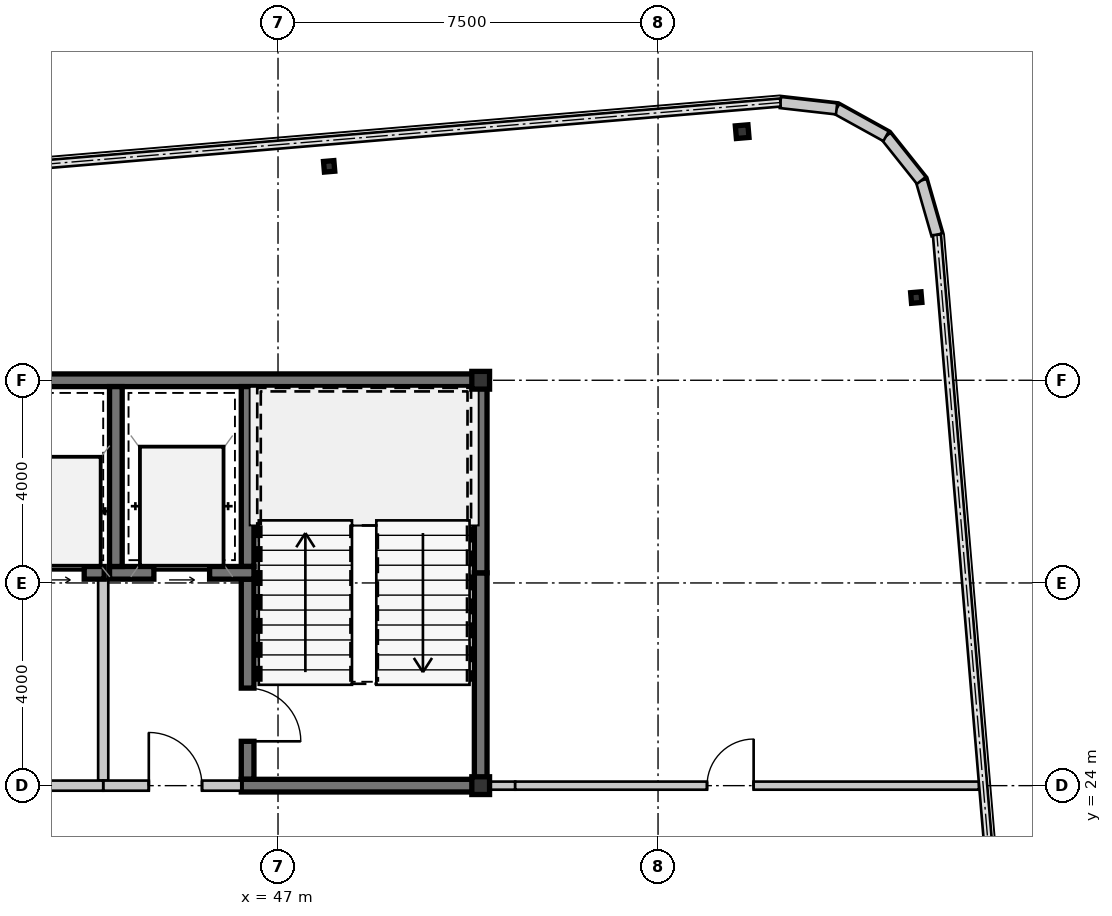
"""IFC4 building model, lengths in metres.
Left out: names, types, materials, properties, quantities, classifications, styles, units other than length and angle.
Written with IfcOpenShell. Run it as: python <this file> out.ifc"""

import sys

from ifc_helpers import new_model, si_unit, direction, frame, frame_2d, origin, origin_2d, place, context, subcontext, project, spatial, rectangle, hollow_rectangle, i_section, extrude, source, transform, mapped, element, fill, save


model = new_model("IFC4")
c1 = context("Model", 3, precision=1e-05, world=origin(), true_north=direction((0.0, 1.0)))
c2 = subcontext(c1, "Body", "Model", "MODEL_VIEW")
j1 = project(units=[si_unit("LENGTHUNIT", "METRE"), si_unit("PLANEANGLEUNIT", "RADIAN")], contexts=[c1])
p1 = place(None, origin())
s1 = spatial("IfcSite", under=j1, at=p1, CompositionType="ELEMENT")
p2 = place(p1, origin())
s2 = spatial("IfcBuilding", under=s1, at=p2, CompositionType="ELEMENT")
p3 = place(p2, frame((0.0, 0.0, 178.85)))
s3 = spatial("IfcBuildingStorey", under=s2, at=p3, CompositionType="ELEMENT", Elevation=178.85)
m1 = source(origin(), c2, "Body", "SweptSolid", [
    extrude(hollow_rectangle(XDim=0.35, YDim=0.35, WallThickness=0.016, at=origin_2d()), origin(), (0.0, 0.0, 1.0), 3.15),
])
for number, where, z_axis, x_axis in (
    (1, (51.0, 24.0, 0.0), (0.0, 0.0, 1.0), (1.0, 0.0, 0.0)),
    (2, (51.0, 32.0, 0.0), (0.0, 0.0, 1.0), (1.0, 0.0, 0.0)),
):
    element("IfcColumn", number, at=place(p3, frame(where, z_axis=z_axis, x_axis=x_axis)), inside=s3, PredefinedType="COLUMN", context=c2, shape_type="MappedRepresentation", body=[
        mapped(m1, transform((0.0, 0.0, 0.0), scale=1.0)),
    ])
m2 = source(origin(), c2, "Body", "SweptSolid", [
    extrude(i_section(OverallWidth=0.205, OverallDepth=0.21, WebThickness=0.009, FlangeThickness=0.014, at=origin_2d()), origin(), (0.0, 0.0, 1.0), 3.15),
])
p4 = place(p3, frame((48.009, 36.221, 0.0), z_axis=(0.0, 0.0, 1.0), x_axis=(0.99649285925, 0.083677843332, 0.0)))
e3 = element("IfcColumn", 3, at=p4, inside=s3, PredefinedType="COLUMN", context=c2, shape_type="MappedRepresentation", body=[
    mapped(m2, transform((0.0, 0.0, 0.0), scale=1.0)),
])
m3 = source(origin(), c2, "Body", "SweptSolid", [
    extrude(hollow_rectangle(XDim=0.25, YDim=0.25, WallThickness=0.01, at=origin_2d()), origin(), (0.0, 0.0, 1.0), 3.15),
])
p5 = place(p3, frame((56.16, 36.906, 0.0), z_axis=(0.0, 0.0, 1.0), x_axis=(0.99649285925, 0.083677843332, 0.0)))
e4 = element("IfcColumn", 4, at=p5, inside=s3, PredefinedType="COLUMN", context=c2, shape_type="MappedRepresentation", body=[
    mapped(m3, transform((0.0, 0.0, 0.0), scale=1.0)),
])
p6 = place(p3, frame((59.596, 33.632, 0.0), z_axis=(0.0, 0.0, 1.0), x_axis=(0.99649285925, 0.083677843332, 0.0)))
e5 = element("IfcColumn", 5, at=p6, inside=s3, PredefinedType="COLUMN", context=c2, shape_type="MappedRepresentation", body=[
    mapped(m2, transform((0.0, 0.0, 0.0), scale=1.0)),
])
m4 = source(origin(), c2, "Body", "SweptSolid", [
    extrude(rectangle(XDim=1.116, YDim=0.22, at=frame_2d((0.558, 0.0))), origin(), (0.0, 0.0, 1.0), 2.93),
])
for number, where, z_axis, x_axis in (
    (6, (60.004, 34.87, 0.0), (0.0, 0.0, 1.0), (-0.277, 0.961, 0.0)),
    (7, (59.696, 35.943, 0.0), (0.0, 0.0, 1.0), (-0.623, 0.782, 0.0)),
    (8, (59.0, 36.816, 0.0), (0.0, 0.0, 1.0), (-0.875, 0.484, 0.0)),
    (9, (58.024, 37.356, 0.0), (0.0, 0.0, 1.0), (-0.994, 0.112, 0.0)),
):
    element("IfcWall", number, at=place(p3, frame(where, z_axis=z_axis, x_axis=x_axis)), inside=s3, PredefinedType="SOLIDWALL", context=c2, shape_type="MappedRepresentation", body=[
        mapped(m4, transform((0.0, 0.0, 0.0), scale=1.0)),
    ])
m5 = source(origin(), c2, "Body", "SweptSolid", [
    extrude(rectangle(XDim=11.925, YDim=0.25, at=frame_2d((5.962, 0.0))), origin(), (0.0, 0.0, 1.0), 2.93),
])
p7 = place(p3, frame((39.2, 32.0, 0.0), z_axis=(0.0, 0.0, 1.0), x_axis=(1.0, 0.0, 0.0)))
e10 = element("IfcWall", 10, at=p7, inside=s3, PredefinedType="SHEAR", context=c2, shape_type="MappedRepresentation", body=[
    mapped(m5, transform((0.0, 0.0, 0.0), scale=1.0)),
])
m6 = source(origin(), c2, "Body", "SweptSolid", [
    extrude(rectangle(XDim=4.075, YDim=0.25, at=frame_2d((2.038, 0.0))), origin(), (0.0, 0.0, 1.0), 2.93),
])
p8 = place(p3, frame((51.0, 24.125, 0.0), z_axis=(0.0, 0.0, 1.0), x_axis=(0.0, 1.0, 0.0)))
e11 = element("IfcWall", 11, at=p8, inside=s3, PredefinedType="SHEAR", context=c2, shape_type="MappedRepresentation", body=[
    mapped(m6, transform((0.0, 0.0, 0.0), scale=1.0)),
])
m7 = source(origin(), c2, "Body", "SweptSolid", [
    extrude(rectangle(XDim=3.675, YDim=0.25, at=frame_2d((1.837, 0.0))), origin(), (0.0, 0.0, 1.0), 2.93),
])
p9 = place(p3, frame((51.0, 28.2, 0.0), z_axis=(0.0, 0.0, 1.0), x_axis=(0.0, 1.0, 0.0)))
e12 = element("IfcWall", 12, at=p9, inside=s3, PredefinedType="SHEAR", context=c2, shape_type="MappedRepresentation", body=[
    mapped(m7, transform((0.0, 0.0, 0.0), scale=1.0)),
])
m8 = source(origin(), c2, "Body", "SweptSolid", [
    extrude(rectangle(XDim=3.55, YDim=0.25, at=frame_2d((1.775, 0.0))), origin(), (0.0, 0.0, 1.0), 2.93),
])
p10 = place(p3, frame((46.4, 31.875, 0.0), z_axis=(0.0, 0.0, 1.0), x_axis=(0.0, -1.0, 0.0)))
e13 = element("IfcWall", 13, at=p10, inside=s3, PredefinedType="SHEAR", context=c2, shape_type="MappedRepresentation", body=[
    mapped(m8, transform((0.0, 0.0, 0.0), scale=1.0)),
])
m9 = source(origin(), c2, "Body", "SweptSolid", [
    extrude(rectangle(XDim=3.95, YDim=0.25, at=frame_2d((1.975, 0.0))), origin(), (0.0, 0.0, 1.0), 2.93),
])
p11 = place(p3, frame((46.4, 28.075, 0.0), z_axis=(0.0, 0.0, 1.0), x_axis=(0.0, -1.0, 0.0)))
e14 = element("IfcWall", 14, at=p11, inside=s3, PredefinedType="SHEAR", context=c2, shape_type="MappedRepresentation", body=[
    mapped(m9, transform((0.0, 0.0, 0.0), scale=1.0)),
])
m10 = source(origin(), c2, "Body", "SweptSolid", [
    extrude(rectangle(XDim=1.05, YDim=2.1, at=frame_2d((0.525, 1.05))), frame((0.0, 0.135, 0.0), z_axis=(0.0, -1.0, 0.0), x_axis=(1.0, 0.0, 0.0)), (0.0, 0.0, 1.0), 0.27),
])
p12 = place(p11, frame((2.15, 0.0, 0.0)))
e15 = element("IfcOpeningElement", 15, at=p12, cuts=e14, PredefinedType="OPENING", context=c2, shape_type="MappedRepresentation", body=[
    mapped(m10, transform((0.0, 0.0, 0.0), scale=1.0)),
])
m11 = source(origin(), c2, "Body", "SweptSolid", [
    extrude(rectangle(XDim=4.85, YDim=0.25, at=frame_2d((2.425, 0.0))), origin(), (0.0, 0.0, 1.0), 2.93),
])
p13 = place(p3, frame((46.275, 24.0, 0.0), z_axis=(0.0, 0.0, 1.0), x_axis=(1.0, 0.0, 0.0)))
e16 = element("IfcWall", 16, at=p13, inside=s3, PredefinedType="SHEAR", context=c2, shape_type="MappedRepresentation", body=[
    mapped(m11, transform((0.0, 0.0, 0.0), scale=1.0)),
])
m12 = source(origin(), c2, "Body", "SweptSolid", [
    extrude(rectangle(XDim=2.85, YDim=0.25, at=frame_2d((1.425, 0.0))), origin(), (0.0, 0.0, 1.0), 2.93),
])
p14 = place(p3, frame((43.675, 28.2, 0.0), z_axis=(0.0, 0.0, 1.0), x_axis=(1.0, 0.0, 0.0)))
e17 = element("IfcWall", 17, at=p14, inside=s3, PredefinedType="SHEAR", context=c2, shape_type="MappedRepresentation", body=[
    mapped(m12, transform((0.0, 0.0, 0.0), scale=1.0)),
])
m13 = source(origin(), c2, "Body", "SweptSolid", [
    extrude(rectangle(XDim=1.1, YDim=2.15, at=frame_2d((0.55, 1.075))), frame((0.0, 0.135, 0.0), z_axis=(0.0, -1.0, 0.0), x_axis=(1.0, 0.0, 0.0)), (0.0, 0.0, 1.0), 0.27),
])
p15 = place(p14, frame((0.875, 0.0, 0.0)))
e18 = element("IfcOpeningElement", 18, at=p15, cuts=e17, PredefinedType="OPENING", context=c2, shape_type="MappedRepresentation", body=[
    mapped(m13, transform((0.0, 0.0, 0.0), scale=1.0)),
])
p16 = place(p3, frame((43.8, 31.875, 0.0), z_axis=(0.0, 0.0, 1.0), x_axis=(0.0, -1.0, 0.0)))
e19 = element("IfcWall", 19, at=p16, inside=s3, PredefinedType="SHEAR", context=c2, shape_type="MappedRepresentation", body=[
    mapped(m8, transform((0.0, 0.0, 0.0), scale=1.0)),
])
m14 = source(origin(), c2, "Body", "SweptSolid", [
    extrude(rectangle(XDim=3.975, YDim=0.2, at=frame_2d((1.987, 0.0))), origin(), (0.0, 0.0, 1.0), 2.93),
])
p17 = place(p3, frame((43.55, 28.075, 0.0), z_axis=(0.0, 0.0, 1.0), x_axis=(0.0, -1.0, 0.0)))
e20 = element("IfcWall", 20, at=p17, inside=s3, PredefinedType="SOLIDWALL", context=c2, shape_type="MappedRepresentation", body=[
    mapped(m14, transform((0.0, 0.0, 0.0), scale=1.0)),
])
m15 = source(origin(), c2, "Body", "SweptSolid", [
    extrude(rectangle(XDim=2.725, YDim=0.2, at=frame_2d((1.362, 0.0))), origin(), (0.0, 0.0, 1.0), 2.397),
])
p18 = place(p3, frame((43.55, 24.0, 0.0), z_axis=(0.0, 0.0, 1.0), x_axis=(1.0, 0.0, 0.0)))
e21 = element("IfcWall", 21, at=p18, inside=s3, PredefinedType="SOLIDWALL", context=c2, shape_type="MappedRepresentation", body=[
    mapped(m15, transform((0.0, 0.0, 0.0), scale=1.0)),
])
m16 = source(origin(), c2, "Body", "SweptSolid", [
    extrude(rectangle(XDim=1.05, YDim=2.1, at=frame_2d((0.525, 1.05))), frame((0.0, 0.11, 0.0), z_axis=(0.0, -1.0, 0.0), x_axis=(1.0, 0.0, 0.0)), (0.0, 0.0, 1.0), 0.22),
])
p19 = place(p18, frame((0.9, 0.0, 0.0)))
e22 = element("IfcOpeningElement", 22, at=p19, cuts=e21, PredefinedType="OPENING", context=c2, shape_type="MappedRepresentation", body=[
    mapped(m16, transform((0.0, 0.0, 0.0), scale=1.0)),
])
m17 = source(origin(), c2, "Body", "SweptSolid", [
    extrude(rectangle(XDim=2.07, YDim=0.25, at=frame_2d((1.035, 0.0))), origin(), (0.0, 0.0, 1.0), 2.93),
])
p20 = place(p3, frame((41.5, 28.2, 0.0), z_axis=(0.0, 0.0, 1.0), x_axis=(1.0, 0.0, 0.0)))
e23 = element("IfcWall", 23, at=p20, inside=s3, PredefinedType="SHEAR", context=c2, shape_type="MappedRepresentation", body=[
    mapped(m17, transform((0.0, 0.0, 0.0), scale=1.0)),
])
m18 = source(origin(), c2, "Body", "SweptSolid", [
    extrude(rectangle(XDim=1.05, YDim=2.15, at=frame_2d((0.525, 1.075))), frame((0.0, 0.135, 0.0), z_axis=(0.0, -1.0, 0.0), x_axis=(1.0, 0.0, 0.0)), (0.0, 0.0, 1.0), 0.27),
])
p21 = place(p20, frame((0.625, 0.0, 0.0)))
e24 = element("IfcOpeningElement", 24, at=p21, cuts=e23, PredefinedType="OPENING", context=c2, shape_type="MappedRepresentation", body=[
    mapped(m18, transform((0.0, 0.0, 0.0), scale=1.0)),
])
m19 = source(origin(), c2, "Body", "SweptSolid", [
    extrude(rectangle(XDim=4.35, YDim=0.2, at=frame_2d((2.175, 0.0))), origin(), (0.0, 0.0, 1.0), 2.397),
])
p22 = place(p3, frame((43.55, 24.0, 0.0), z_axis=(0.0, 0.0, 1.0), x_axis=(-1.0, 0.0, 0.0)))
e25 = element("IfcWall", 25, at=p22, inside=s3, PredefinedType="SOLIDWALL", context=c2, shape_type="MappedRepresentation", body=[
    mapped(m19, transform((0.0, 0.0, 0.0), scale=1.0)),
])
p23 = place(p22, frame((1.65, 0.0, 0.0)))
e26 = element("IfcOpeningElement", 26, at=p23, cuts=e25, PredefinedType="OPENING", context=c2, shape_type="MappedRepresentation", body=[
    mapped(m16, transform((0.0, 0.0, 0.0), scale=1.0)),
])
m20 = source(origin(), c2, "Body", "SweptSolid", [
    extrude(rectangle(XDim=0.556, YDim=0.16, at=frame_2d((0.278, 0.0))), origin(), (0.0, 0.0, 1.0), 2.47),
])
p24 = place(p3, frame((51.125, 24.0, 0.0), z_axis=(0.0, 0.0, 1.0), x_axis=(1.0, 0.0, 0.0)))
e27 = element("IfcWall", 27, at=p24, inside=s3, PredefinedType="PARTITIONING", context=c2, shape_type="MappedRepresentation", body=[
    mapped(m20, transform((0.0, 0.0, 0.0), scale=1.0)),
])
m21 = source(origin(), c2, "Body", "SweptSolid", [
    extrude(rectangle(XDim=9.153, YDim=0.16, at=frame_2d((4.576, 0.0))), origin(), (0.0, 0.0, 1.0), 2.93),
])
p25 = place(p3, frame((51.681, 24.0, 0.0), z_axis=(0.0, 0.0, 1.0), x_axis=(1.0, 0.0, 0.0)))
e28 = element("IfcWall", 28, at=p25, inside=s3, PredefinedType="PARTITIONING", context=c2, shape_type="MappedRepresentation", body=[
    mapped(m21, transform((0.0, 0.0, 0.0), scale=1.0)),
])
m22 = source(origin(), c2, "Body", "SweptSolid", [
    extrude(rectangle(XDim=0.92, YDim=2.1, at=frame_2d((0.46, 1.05))), frame((0.0, 0.09, 0.0), z_axis=(0.0, -1.0, 0.0), x_axis=(1.0, 0.0, 0.0)), (0.0, 0.0, 1.0), 0.18),
])
p26 = place(p25, frame((3.786, 0.0, 0.0)))
e29 = element("IfcOpeningElement", 29, at=p26, cuts=e28, PredefinedType="OPENING", context=c2, shape_type="MappedRepresentation", body=[
    mapped(m22, transform((0.0, 0.0, 0.0), scale=1.0)),
])
m23 = source(origin(), c2, "Body", "SweptSolid", [
    extrude(rectangle(XDim=1.05, YDim=2.1, at=frame_2d((0.525, 1.05))), frame((0.0, 0.025, 0.0), z_axis=(0.0, -1.0, 0.0), x_axis=(1.0, 0.0, 0.0)), (0.0, 0.0, 1.0), 0.05),
])
p27 = place(p12, origin())
e30 = element("IfcDoor", 30, at=p27, inside=s3, OperationType="SINGLE_SWING_RIGHT", PredefinedType="DOOR", context=c2, shape_type="MappedRepresentation", body=[
    mapped(m23, transform((0.0, 0.0, 0.0), scale=1.0)),
])
fill(e15, e30)
m24 = source(origin(), c2, "Body", "SweptSolid", [
    extrude(rectangle(XDim=1.1, YDim=2.15, at=frame_2d((0.55, 1.075))), frame((0.0, 0.025, 0.0), z_axis=(0.0, -1.0, 0.0), x_axis=(1.0, 0.0, 0.0)), (0.0, 0.0, 1.0), 0.05),
])
p28 = place(p15, origin())
e31 = element("IfcDoor", 31, at=p28, inside=s3, OperationType="SLIDING_TO_LEFT", PredefinedType="DOOR", context=c2, shape_type="MappedRepresentation", body=[
    mapped(m24, transform((0.0, 0.0, 0.0), scale=1.0)),
])
fill(e18, e31)
p29 = place(p19, origin())
e32 = element("IfcDoor", 32, at=p29, inside=s3, OperationType="SINGLE_SWING_LEFT", PredefinedType="DOOR", context=c2, shape_type="MappedRepresentation", body=[
    mapped(m23, transform((0.0, 0.0, 0.0), scale=1.0)),
])
fill(e22, e32)
m25 = source(origin(), c2, "Body", "SweptSolid", [
    extrude(rectangle(XDim=1.05, YDim=2.15, at=frame_2d((0.525, 1.075))), frame((0.0, 0.025, 0.0), z_axis=(0.0, -1.0, 0.0), x_axis=(1.0, 0.0, 0.0)), (0.0, 0.0, 1.0), 0.05),
])
p30 = place(p21, origin())
e33 = element("IfcDoor", 33, at=p30, inside=s3, OperationType="SLIDING_TO_LEFT", PredefinedType="DOOR", context=c2, shape_type="MappedRepresentation", body=[
    mapped(m25, transform((0.0, 0.0, 0.0), scale=1.0)),
])
fill(e24, e33)
m26 = source(origin(), c2, "Body", "SweptSolid", [
    extrude(rectangle(XDim=0.92, YDim=2.1, at=frame_2d((0.46, 1.05))), frame((0.0, 0.025, 0.0), z_axis=(0.0, -1.0, 0.0), x_axis=(1.0, 0.0, 0.0)), (0.0, 0.0, 1.0), 0.05),
])
p31 = place(p26, origin())
e34 = element("IfcDoor", 34, at=p31, inside=s3, OperationType="SINGLE_SWING_RIGHT", PredefinedType="DOOR", context=c2, shape_type="MappedRepresentation", body=[
    mapped(m26, transform((0.0, 0.0, 0.0), scale=1.0)),
])
fill(e29, e34)
save(model, sys.argv[1])
